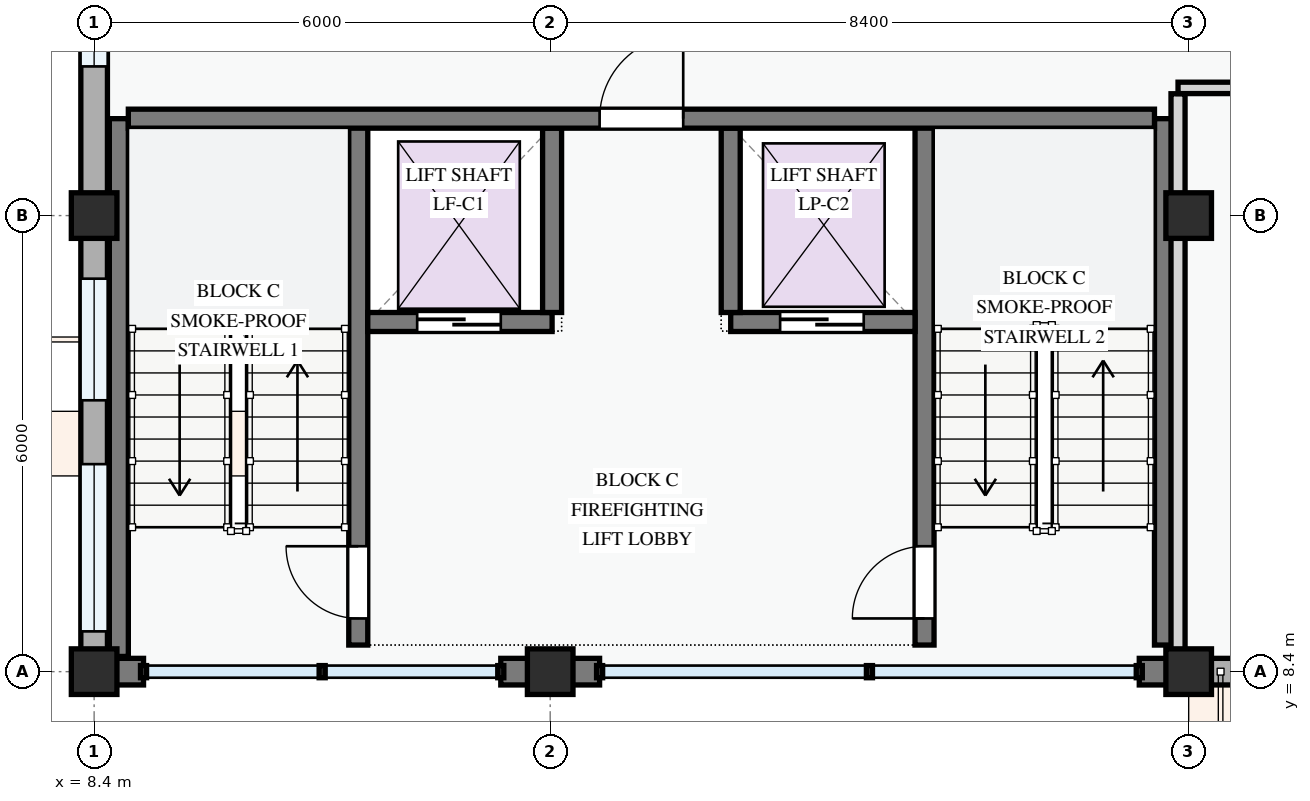
"""IFC4 building model, lengths in metres.
Left out: names, types, materials, properties, quantities, classifications, styles, units other than length and angle.
Written with IfcOpenShell. Run it as: python <this file> out.ifc"""

import sys

from ifc_helpers import new_model, si_unit, direction, frame, frame_2d, origin, origin_2d, place, context, subcontext, project, spatial, rectangle, extrude, element, fill, save


model = new_model("IFC4")
c1 = context("Model", 3, precision=1e-05, world=origin(), true_north=direction((0.0, 1.0)))
c2 = subcontext(c1, "Body", "Model", "MODEL_VIEW")
j1 = project(units=[si_unit("LENGTHUNIT", "METRE"), si_unit("PLANEANGLEUNIT", "RADIAN")], contexts=[c1])
p1 = place(None, origin())
s1 = spatial("IfcSite", under=j1, at=p1, CompositionType="ELEMENT")
p2 = place(p1, origin())
s2 = spatial("IfcBuilding", under=s1, at=p2, CompositionType="ELEMENT")
p3 = place(p2, frame((0.0, 0.0, 8.1)))
s3 = spatial("IfcBuildingStorey", under=s2, at=p3, CompositionType="ELEMENT", Elevation=8.1)
for number, where, z_axis, x_axis in (
    (1, (8.4, 8.4, 0.0), (0.0, 0.0, 1.0), (1.0, 0.0, 0.0)),
    (2, (8.4, 14.4, 0.0), (0.0, 0.0, 1.0), (1.0, 0.0, 0.0)),
    (3, (14.4, 8.4, 0.0), (0.0, 0.0, 1.0), (1.0, 0.0, 0.0)),
    (4, (22.8, 8.4, 0.0), (0.0, 0.0, 1.0), (1.0, 0.0, 0.0)),
    (5, (22.8, 14.4, 0.0), (0.0, 0.0, 1.0), (1.0, 0.0, 0.0)),
):
    element("IfcColumn", number, at=place(p3, frame(where, z_axis=z_axis, x_axis=x_axis)), inside=s3, PredefinedType="COLUMN", context=c2, shape_type="SweptSolid", body=[
        extrude(rectangle(XDim=0.6, YDim=0.6, at=origin_2d()), origin(), (0.0, 0.0, 1.0), 3.3),
    ])
p4 = place(p3, frame((8.4, 22.8, 0.0), z_axis=(0.0, 0.0, 1.0), x_axis=(0.0, -1.0, 0.0)))
e6 = element("IfcWall", 6, at=p4, inside=s3, PredefinedType="STANDARD", context=c2, shape_type="SweptSolid", body=[
    extrude(rectangle(XDim=8.4, YDim=0.35, at=frame_2d((4.2, 0.0))), origin(), (0.0, 0.0, 1.0), 2.345),
])
p5 = place(p4, frame((1.485, 0.0, 0.78)))
e7 = element("IfcOpeningElement", 7, at=p5, cuts=e6, PredefinedType="OPENING", context=c2, shape_type="SweptSolid", body=[
    extrude(rectangle(XDim=1.42, YDim=1.38, at=frame_2d((0.71, 0.69))), frame((0.0, 0.185, 0.0), z_axis=(0.0, -1.0, 0.0), x_axis=(1.0, 0.0, 0.0)), (0.0, 0.0, 1.0), 0.37),
])
p6 = place(p4, frame((4.887, 0.0, 0.78)))
e8 = element("IfcOpeningElement", 8, at=p6, cuts=e6, PredefinedType="OPENING", context=c2, shape_type="SweptSolid", body=[
    extrude(rectangle(XDim=1.55, YDim=1.4, at=frame_2d((0.775, 0.7))), frame((0.0, 0.185, 0.0), z_axis=(0.0, -1.0, 0.0), x_axis=(1.0, 0.0, 0.0)), (0.0, 0.0, 1.0), 0.37),
])
p7 = place(p3, frame((8.4, 14.4, 0.0), z_axis=(0.0, 0.0, 1.0), x_axis=(0.0, -1.0, 0.0)))
e9 = element("IfcWall", 9, at=p7, inside=s3, PredefinedType="STANDARD", context=c2, shape_type="SweptSolid", body=[
    extrude(rectangle(XDim=6.0, YDim=0.35, at=frame_2d((3.0, 0.0))), origin(), (0.0, 0.0, 1.0), 2.445),
])
p8 = place(p7, frame((0.83, 0.0, 0.78)))
e10 = element("IfcOpeningElement", 10, at=p8, cuts=e9, PredefinedType="OPENING", context=c2, shape_type="SweptSolid", body=[
    extrude(rectangle(XDim=1.6, YDim=1.55, at=frame_2d((0.8, 0.775))), frame((0.0, 0.185, 0.0), z_axis=(0.0, -1.0, 0.0), x_axis=(1.0, 0.0, 0.0)), (0.0, 0.0, 1.0), 0.37),
])
p9 = place(p7, frame((3.27, 0.0, 0.78)))
e11 = element("IfcOpeningElement", 11, at=p9, cuts=e9, PredefinedType="OPENING", context=c2, shape_type="SweptSolid", body=[
    extrude(rectangle(XDim=2.2, YDim=1.5, at=frame_2d((1.1, 0.75))), frame((0.0, 0.185, 0.0), z_axis=(0.0, -1.0, 0.0), x_axis=(1.0, 0.0, 0.0)), (0.0, 0.0, 1.0), 0.37),
])
p10 = place(p3, frame((8.577, 8.4, 0.0), z_axis=(0.0, 0.0, 1.0), x_axis=(1.0, 0.0, 0.0)))
e12 = element("IfcWall", 12, at=p10, inside=s3, PredefinedType="STANDARD", context=c2, shape_type="SweptSolid", body=[
    extrude(rectangle(XDim=0.473, YDim=0.35, at=frame_2d((0.237, 0.0))), origin(), (0.0, 0.0, 1.0), 3.04),
])
p11 = place(p3, frame((13.75, 8.4, 0.0), z_axis=(0.0, 0.0, 1.0), x_axis=(1.0, 0.0, 0.0)))
e13 = element("IfcWall", 13, at=p11, inside=s3, PredefinedType="STANDARD", context=c2, shape_type="SweptSolid", body=[
    extrude(rectangle(XDim=0.65, YDim=0.35, at=frame_2d((0.325, 0.0))), origin(), (0.0, 0.0, 1.0), 3.04),
])
for number, where, z_axis, x_axis in (
    (14, (14.4, 8.4, 0.0), (0.0, 0.0, 1.0), (1.0, 0.0, 0.0)),
    (15, (22.15, 8.4, 0.0), (0.0, 0.0, 1.0), (1.0, 0.0, 0.0)),
):
    element("IfcWall", number, at=place(p3, frame(where, z_axis=z_axis, x_axis=x_axis)), inside=s3, PredefinedType="STANDARD", context=c2, shape_type="SweptSolid", body=[
        extrude(rectangle(XDim=0.65, YDim=0.35, at=frame_2d((0.325, 0.0))), origin(), (0.0, 0.0, 1.0), 3.04),
    ])
p12 = place(p3, frame((22.8, 8.4, 0.0), z_axis=(0.0, 0.0, 1.0), x_axis=(1.0, 0.0, 0.0)))
e16 = element("IfcWall", 16, at=p12, inside=s3, PredefinedType="STANDARD", context=c2, shape_type="SweptSolid", body=[
    extrude(rectangle(XDim=6.0, YDim=0.35, at=frame_2d((3.0, 0.0))), origin(), (0.0, 0.0, 1.0), 2.475),
])
p13 = place(p12, frame((0.62, 0.0, 0.0)))
e17 = element("IfcOpeningElement", 17, at=p13, cuts=e16, PredefinedType="OPENING", context=c2, shape_type="SweptSolid", body=[
    extrude(rectangle(XDim=1.05, YDim=2.15, at=frame_2d((0.525, 1.075))), frame((0.0, 0.185, 0.0), z_axis=(0.0, -1.0, 0.0), x_axis=(1.0, 0.0, 0.0)), (0.0, 0.0, 1.0), 0.37),
])
p14 = place(p12, frame((2.355, 0.0, 0.78)))
e18 = element("IfcOpeningElement", 18, at=p14, cuts=e16, PredefinedType="OPENING", context=c2, shape_type="SweptSolid", body=[
    extrude(rectangle(XDim=1.2, YDim=1.5, at=frame_2d((0.6, 0.75))), frame((0.0, 0.185, 0.0), z_axis=(0.0, -1.0, 0.0), x_axis=(1.0, 0.0, 0.0)), (0.0, 0.0, 1.0), 0.37),
])
p15 = place(p12, frame((4.5, 0.0, 0.78)))
e19 = element("IfcOpeningElement", 19, at=p15, cuts=e16, PredefinedType="OPENING", context=c2, shape_type="SweptSolid", body=[
    extrude(rectangle(XDim=1.0, YDim=1.25, at=frame_2d((0.5, 0.625))), frame((0.0, 0.185, 0.0), z_axis=(0.0, -1.0, 0.0), x_axis=(1.0, 0.0, 0.0)), (0.0, 0.0, 1.0), 0.37),
])
p16 = place(p3, frame((11.875, 8.75, 0.0), z_axis=(0.0, 0.0, 1.0), x_axis=(0.0, 1.0, 0.0)))
e20 = element("IfcWall", 20, at=p16, inside=s3, PredefinedType="SHEAR", context=c2, shape_type="SweptSolid", body=[
    extrude(rectangle(XDim=6.925, YDim=0.25, at=frame_2d((3.462, 0.0))), origin(), (0.0, 0.0, 1.0), 3.0),
])
p17 = place(p16, frame((0.35, 0.0, 0.0)))
e21 = element("IfcOpeningElement", 21, at=p17, cuts=e20, PredefinedType="OPENING", context=c2, shape_type="SweptSolid", body=[
    extrude(rectangle(XDim=0.95, YDim=2.1, at=frame_2d((0.475, 1.05))), frame((0.0, 0.135, 0.0), z_axis=(0.0, -1.0, 0.0), x_axis=(1.0, 0.0, 0.0)), (0.0, 0.0, 1.0), 0.27),
])
p18 = place(p3, frame((8.725, 8.6, 0.0), z_axis=(0.0, 0.0, 1.0), x_axis=(0.0, 1.0, 0.0)))
e22 = element("IfcWall", 22, at=p18, inside=s3, PredefinedType="SHEAR", context=c2, shape_type="SweptSolid", body=[
    extrude(rectangle(XDim=7.075, YDim=0.25, at=frame_2d((3.538, 0.0))), origin(), (0.0, 0.0, 1.0), 3.0),
])
p19 = place(p3, frame((22.475, 8.75, 0.0), z_axis=(0.0, 0.0, 1.0), x_axis=(0.0, 1.0, 0.0)))
e23 = element("IfcWall", 23, at=p19, inside=s3, PredefinedType="SHEAR", context=c2, shape_type="SweptSolid", body=[
    extrude(rectangle(XDim=6.925, YDim=0.25, at=frame_2d((3.462, 0.0))), origin(), (0.0, 0.0, 1.0), 3.0),
])
p20 = place(p3, frame((19.325, 8.75, 0.0), z_axis=(0.0, 0.0, 1.0), x_axis=(0.0, 1.0, 0.0)))
e24 = element("IfcWall", 24, at=p20, inside=s3, PredefinedType="SHEAR", context=c2, shape_type="SweptSolid", body=[
    extrude(rectangle(XDim=6.925, YDim=0.25, at=frame_2d((3.462, 0.0))), origin(), (0.0, 0.0, 1.0), 3.0),
])
p21 = place(p20, frame((0.35, 0.0, 0.0)))
e25 = element("IfcOpeningElement", 25, at=p21, cuts=e24, PredefinedType="OPENING", context=c2, shape_type="SweptSolid", body=[
    extrude(rectangle(XDim=0.95, YDim=2.1, at=frame_2d((0.475, 1.05))), frame((0.0, 0.135, 0.0), z_axis=(0.0, -1.0, 0.0), x_axis=(1.0, 0.0, 0.0)), (0.0, 0.0, 1.0), 0.27),
])
p22 = place(p3, frame((12.0, 13.0, 0.0), z_axis=(0.0, 0.0, 1.0), x_axis=(1.0, 0.0, 0.0)))
e26 = element("IfcWall", 26, at=p22, inside=s3, PredefinedType="SHEAR", context=c2, shape_type="SweptSolid", body=[
    extrude(rectangle(XDim=2.425, YDim=0.25, at=frame_2d((1.212, 0.0))), origin(), (0.0, 0.0, 1.0), 3.0),
])
p23 = place(p22, frame((0.65, 0.0, 0.0)))
e27 = element("IfcOpeningElement", 27, at=p23, cuts=e26, PredefinedType="OPENING", context=c2, shape_type="SweptSolid", body=[
    extrude(rectangle(XDim=1.1, YDim=2.15, at=frame_2d((0.55, 1.075))), frame((0.0, 0.135, 0.0), z_axis=(0.0, -1.0, 0.0), x_axis=(1.0, 0.0, 0.0)), (0.0, 0.0, 1.0), 0.27),
])
p24 = place(p3, frame((16.775, 13.0, 0.0), z_axis=(0.0, 0.0, 1.0), x_axis=(1.0, 0.0, 0.0)))
e28 = element("IfcWall", 28, at=p24, inside=s3, PredefinedType="SHEAR", context=c2, shape_type="SweptSolid", body=[
    extrude(rectangle(XDim=2.425, YDim=0.25, at=frame_2d((1.212, 0.0))), origin(), (0.0, 0.0, 1.0), 3.0),
])
p25 = place(p24, frame((0.65, 0.0, 0.0)))
e29 = element("IfcOpeningElement", 29, at=p25, cuts=e28, PredefinedType="OPENING", context=c2, shape_type="SweptSolid", body=[
    extrude(rectangle(XDim=1.1, YDim=2.15, at=frame_2d((0.55, 1.075))), frame((0.0, 0.135, 0.0), z_axis=(0.0, -1.0, 0.0), x_axis=(1.0, 0.0, 0.0)), (0.0, 0.0, 1.0), 0.27),
])
for number, where, z_axis, x_axis in (
    (30, (14.425, 13.125, 0.0), (0.0, 0.0, 1.0), (0.0, 1.0, 0.0)),
    (31, (16.775, 13.125, 0.0), (0.0, 0.0, 1.0), (0.0, 1.0, 0.0)),
):
    element("IfcWall", number, at=place(p3, frame(where, z_axis=z_axis, x_axis=x_axis)), inside=s3, PredefinedType="SHEAR", context=c2, shape_type="SweptSolid", body=[
        extrude(rectangle(XDim=2.425, YDim=0.25, at=frame_2d((1.212, 0.0))), origin(), (0.0, 0.0, 1.0), 3.0),
    ])
p26 = place(p3, frame((8.85, 15.675, 0.0), z_axis=(0.0, 0.0, 1.0), x_axis=(1.0, 0.0, 0.0)))
e32 = element("IfcWall", 32, at=p26, inside=s3, PredefinedType="SHEAR", context=c2, shape_type="SweptSolid", body=[
    extrude(rectangle(XDim=13.5, YDim=0.25, at=frame_2d((6.75, 0.0))), origin(), (0.0, 0.0, 1.0), 3.0),
])
p27 = place(p26, frame((6.2, 0.0, 0.0)))
e33 = element("IfcOpeningElement", 33, at=p27, cuts=e32, PredefinedType="OPENING", context=c2, shape_type="SweptSolid", body=[
    extrude(rectangle(XDim=1.1, YDim=2.15, at=frame_2d((0.55, 1.075))), frame((0.0, 0.135, 0.0), z_axis=(0.0, -1.0, 0.0), x_axis=(1.0, 0.0, 0.0)), (0.0, 0.0, 1.0), 0.27),
])
p28 = place(p3, frame((22.66, 8.577, 0.0), z_axis=(0.0, 0.0, 1.0), x_axis=(0.0, 1.0, 0.0)))
e34 = element("IfcWall", 34, at=p28, inside=s3, PredefinedType="PARTITIONING", context=c2, shape_type="SweptSolid", body=[
    extrude(rectangle(XDim=7.426, YDim=0.185, at=frame_2d((3.713, 0.0))), origin(), (0.0, 0.0, 1.0), 2.425),
])
p29 = place(p3, frame((22.66, 16.08, 0.0), z_axis=(0.0, 0.0, 1.0), x_axis=(1.0, 0.0, 0.0)))
e35 = element("IfcWall", 35, at=p29, inside=s3, PredefinedType="PARTITIONING", context=c2, shape_type="SweptSolid", body=[
    extrude(rectangle(XDim=34.763, YDim=0.15, at=frame_2d((17.382, 0.0))), origin(), (0.0, 0.0, 1.0), 3.0),
])
p30 = place(p29, frame((2.672, 0.0, 0.0)))
e36 = element("IfcOpeningElement", 36, at=p30, cuts=e35, PredefinedType="OPENING", context=c2, shape_type="SweptSolid", body=[
    extrude(rectangle(XDim=0.92, YDim=2.1, at=frame_2d((0.46, 1.05))), frame((0.0, 0.085, 0.0), z_axis=(0.0, -1.0, 0.0), x_axis=(1.0, 0.0, 0.0)), (0.0, 0.0, 1.0), 0.17),
])
p31 = place(p29, frame((16.58, 0.0, 0.0)))
e37 = element("IfcOpeningElement", 37, at=p31, cuts=e35, PredefinedType="OPENING", context=c2, shape_type="SweptSolid", body=[
    extrude(rectangle(XDim=0.96, YDim=2.12, at=frame_2d((0.48, 1.06))), frame((0.0, 0.085, 0.0), z_axis=(0.0, -1.0, 0.0), x_axis=(1.0, 0.0, 0.0)), (0.0, 0.0, 1.0), 0.17),
])
p32 = place(p29, frame((24.315, 0.0, 0.0)))
e38 = element("IfcOpeningElement", 38, at=p32, cuts=e35, PredefinedType="OPENING", context=c2, shape_type="SweptSolid", body=[
    extrude(rectangle(XDim=0.92, YDim=2.1, at=frame_2d((0.46, 1.05))), frame((0.0, 0.085, 0.0), z_axis=(0.0, -1.0, 0.0), x_axis=(1.0, 0.0, 0.0)), (0.0, 0.0, 1.0), 0.17),
])
p33 = place(p6, origin())
e39 = element("IfcWindow", 39, at=p33, inside=s3, PartitioningType="SINGLE_PANEL", PredefinedType="WINDOW", context=c2, shape_type="SweptSolid", body=[
    extrude(rectangle(XDim=1.55, YDim=1.4, at=frame_2d((0.775, 0.7))), frame((0.0, 0.03, 0.0), z_axis=(0.0, -1.0, 0.0), x_axis=(1.0, 0.0, 0.0)), (0.0, 0.0, 1.0), 0.06),
])
fill(e8, e39)
p34 = place(p8, origin())
e40 = element("IfcWindow", 40, at=p34, inside=s3, PartitioningType="DOUBLE_PANEL_VERTICAL", PredefinedType="WINDOW", context=c2, shape_type="SweptSolid", body=[
    extrude(rectangle(XDim=1.6, YDim=1.55, at=frame_2d((0.8, 0.775))), frame((0.0, 0.03, 0.0), z_axis=(0.0, -1.0, 0.0), x_axis=(1.0, 0.0, 0.0)), (0.0, 0.0, 1.0), 0.06),
])
fill(e10, e40)
p35 = place(p9, origin())
e41 = element("IfcWindow", 41, at=p35, inside=s3, PartitioningType="DOUBLE_PANEL_VERTICAL", PredefinedType="WINDOW", context=c2, shape_type="SweptSolid", body=[
    extrude(rectangle(XDim=2.2, YDim=1.5, at=frame_2d((1.1, 0.75))), frame((0.0, 0.03, 0.0), z_axis=(0.0, -1.0, 0.0), x_axis=(1.0, 0.0, 0.0)), (0.0, 0.0, 1.0), 0.06),
])
fill(e11, e41)
p36 = place(p17, origin())
e42 = element("IfcDoor", 42, at=p36, inside=s3, OperationType="SINGLE_SWING_RIGHT", PredefinedType="DOOR", context=c2, shape_type="SweptSolid", body=[
    extrude(rectangle(XDim=0.95, YDim=2.1, at=frame_2d((0.475, 1.05))), frame((0.0, 0.025, 0.0), z_axis=(0.0, -1.0, 0.0), x_axis=(1.0, 0.0, 0.0)), (0.0, 0.0, 1.0), 0.05),
])
fill(e21, e42)
p37 = place(p21, origin())
e43 = element("IfcDoor", 43, at=p37, inside=s3, OperationType="SINGLE_SWING_LEFT", PredefinedType="DOOR", context=c2, shape_type="SweptSolid", body=[
    extrude(rectangle(XDim=0.95, YDim=2.1, at=frame_2d((0.475, 1.05))), frame((0.0, 0.025, 0.0), z_axis=(0.0, -1.0, 0.0), x_axis=(1.0, 0.0, 0.0)), (0.0, 0.0, 1.0), 0.05),
])
fill(e25, e43)
p38 = place(p23, origin())
e44 = element("IfcDoor", 44, at=p38, inside=s3, OperationType="SLIDING_TO_LEFT", PredefinedType="DOOR", context=c2, shape_type="SweptSolid", body=[
    extrude(rectangle(XDim=1.1, YDim=2.15, at=frame_2d((0.55, 1.075))), frame((0.0, 0.025, 0.0), z_axis=(0.0, -1.0, 0.0), x_axis=(1.0, 0.0, 0.0)), (0.0, 0.0, 1.0), 0.05),
])
fill(e27, e44)
p39 = place(p25, origin())
e45 = element("IfcDoor", 45, at=p39, inside=s3, OperationType="SLIDING_TO_LEFT", PredefinedType="DOOR", context=c2, shape_type="SweptSolid", body=[
    extrude(rectangle(XDim=1.1, YDim=2.15, at=frame_2d((0.55, 1.075))), frame((0.0, 0.025, 0.0), z_axis=(0.0, -1.0, 0.0), x_axis=(1.0, 0.0, 0.0)), (0.0, 0.0, 1.0), 0.05),
])
fill(e29, e45)
p40 = place(p27, origin())
e46 = element("IfcDoor", 46, at=p40, inside=s3, OperationType="SINGLE_SWING_RIGHT", PredefinedType="DOOR", context=c2, shape_type="SweptSolid", body=[
    extrude(rectangle(XDim=1.1, YDim=2.15, at=frame_2d((0.55, 1.075))), frame((0.0, 0.025, 0.0), z_axis=(0.0, -1.0, 0.0), x_axis=(1.0, 0.0, 0.0)), (0.0, 0.0, 1.0), 0.05),
])
fill(e33, e46)
save(model, sys.argv[1])
